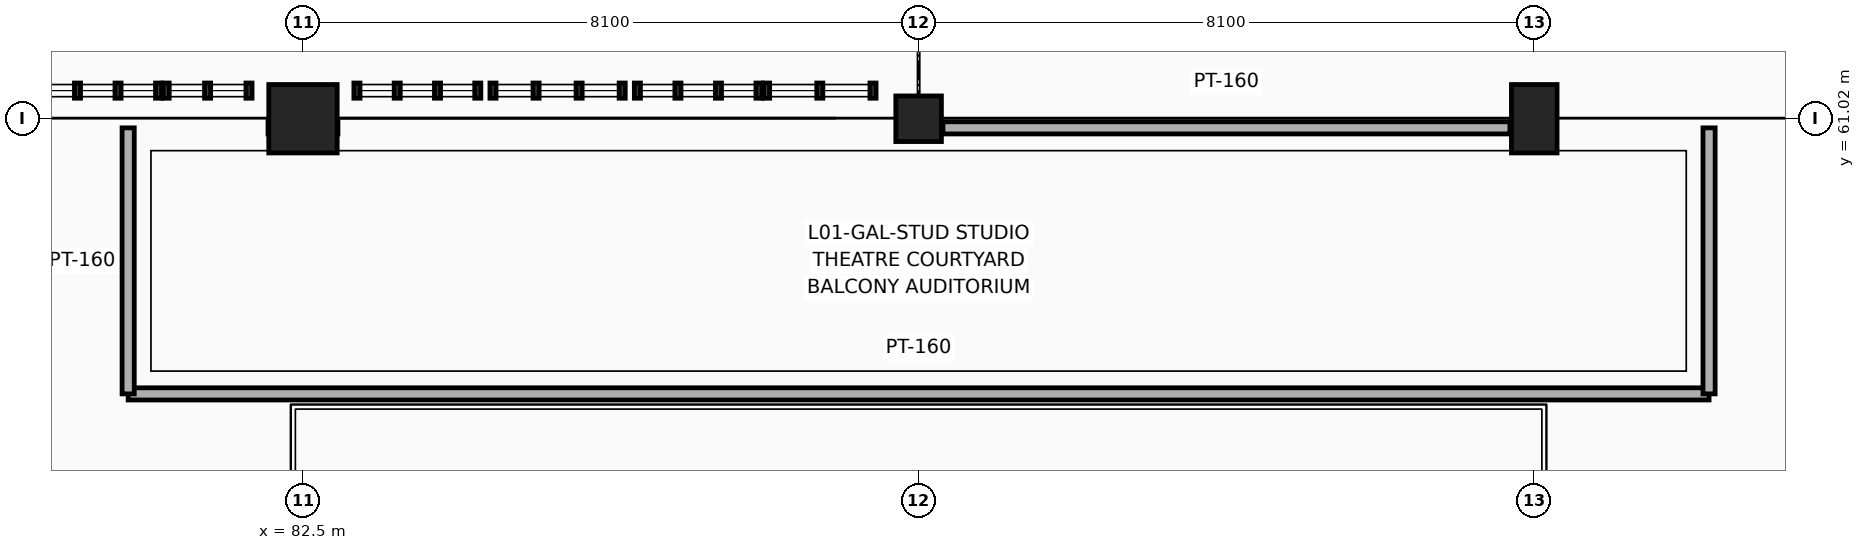
"""IFC4 building model, lengths in metres.
Left out: names, types, materials, properties, quantities, classifications, styles, units other than length and angle.
Written with IfcOpenShell. Run it as: python <this file> out.ifc"""

import sys

from ifc_helpers import new_model, si_unit, direction, frame, frame_2d, origin, origin_2d, place, context, subcontext, project, spatial, rectangle, extrude, element, save


model = new_model("IFC4")
c1 = context("Model", 3, precision=1e-05, world=origin(), true_north=direction((0.0, 1.0)))
c2 = subcontext(c1, "Body", "Model", "MODEL_VIEW")
j1 = project(units=[si_unit("LENGTHUNIT", "METRE"), si_unit("PLANEANGLEUNIT", "RADIAN")], contexts=[c1])
p1 = place(None, origin())
s1 = spatial("IfcSite", under=j1, at=p1, CompositionType="ELEMENT")
p2 = place(p1, origin())
s2 = spatial("IfcBuilding", under=s1, at=p2, CompositionType="ELEMENT")
p3 = place(p2, frame((0.0, 0.0, 5.4)))
s3 = spatial("IfcBuildingStorey", under=s2, at=p3, CompositionType="ELEMENT", Elevation=5.4)
p4 = place(p3, frame((82.5, 61.02, 0.0), z_axis=(0.0, 0.0, 1.0), x_axis=(1.0, 0.0, 0.0)))
e1 = element("IfcColumn", 1, at=p4, inside=s3, PredefinedType="COLUMN", context=c2, shape_type="SweptSolid", body=[
    extrude(rectangle(XDim=0.9, YDim=0.9, at=origin_2d()), origin(), (0.0, 0.0, 1.0), 4.8),
])
p5 = place(p3, frame((90.6, 61.02, 0.0), z_axis=(0.0, 0.0, 1.0), x_axis=(1.0, 0.0, 0.0)))
e2 = element("IfcColumn", 2, at=p5, inside=s3, PredefinedType="COLUMN", context=c2, shape_type="SweptSolid", body=[
    extrude(rectangle(XDim=0.6, YDim=0.6, at=origin_2d()), origin(), (0.0, 0.0, 1.0), 4.8),
])
p6 = place(p3, frame((98.7, 61.02, 0.0), z_axis=(0.0, 0.0, 1.0), x_axis=(1.0, 0.0, 0.0)))
e3 = element("IfcColumn", 3, at=p6, inside=s3, PredefinedType="COLUMN", context=c2, shape_type="SweptSolid", body=[
    extrude(rectangle(XDim=0.6, YDim=0.9, at=origin_2d()), origin(), (0.0, 0.0, 1.0), 4.8),
])
p7 = place(p3, frame((80.2, 57.4, 0.0), z_axis=(0.0, 0.0, 1.0), x_axis=(1.0, 0.0, 0.0)))
e4 = element("IfcWall", 4, at=p7, inside=s3, PredefinedType="PARTITIONING", context=c2, shape_type="SweptSolid", body=[
    extrude(rectangle(XDim=20.8, YDim=0.16, at=frame_2d((10.4, 0.0))), origin(), (0.0, 0.0, 1.0), 4.505),
])
p8 = place(p3, frame((82.04, 60.9, 0.0), z_axis=(0.0, 0.0, 1.0), x_axis=(1.0, 0.0, 0.0)))
e5 = element("IfcWall", 5, at=p8, inside=s3, PredefinedType="PARTITIONING", context=c2, shape_type="SweptSolid", body=[
    extrude(rectangle(XDim=0.92, YDim=0.16, at=frame_2d((0.46, 0.0))), origin(), (0.0, 0.0, 1.0), 3.287),
])
p9 = place(p3, frame((90.92, 60.9, 0.0), z_axis=(0.0, 0.0, 1.0), x_axis=(1.0, 0.0, 0.0)))
e6 = element("IfcWall", 6, at=p9, inside=s3, PredefinedType="PARTITIONING", context=c2, shape_type="SweptSolid", body=[
    extrude(rectangle(XDim=7.46, YDim=0.16, at=frame_2d((3.73, 0.0))), origin(), (0.0, 0.0, 1.0), 3.687),
])
p10 = place(p3, frame((80.2, 57.4, 0.0), z_axis=(0.0, 0.0, 1.0), x_axis=(0.0, 1.0, 0.0)))
e7 = element("IfcWall", 7, at=p10, inside=s3, PredefinedType="PARTITIONING", context=c2, shape_type="SweptSolid", body=[
    extrude(rectangle(XDim=3.5, YDim=0.16, at=frame_2d((1.75, 0.0))), origin(), (0.0, 0.0, 1.0), 3.287),
])
p11 = place(p3, frame((101.0, 57.4, 0.0), z_axis=(0.0, 0.0, 1.0), x_axis=(0.0, 1.0, 0.0)))
e8 = element("IfcWall", 8, at=p11, inside=s3, PredefinedType="PARTITIONING", context=c2, shape_type="SweptSolid", body=[
    extrude(rectangle(XDim=3.5, YDim=0.16, at=frame_2d((1.75, 0.0))), origin(), (0.0, 0.0, 1.0), 4.505),
])
save(model, sys.argv[1])
